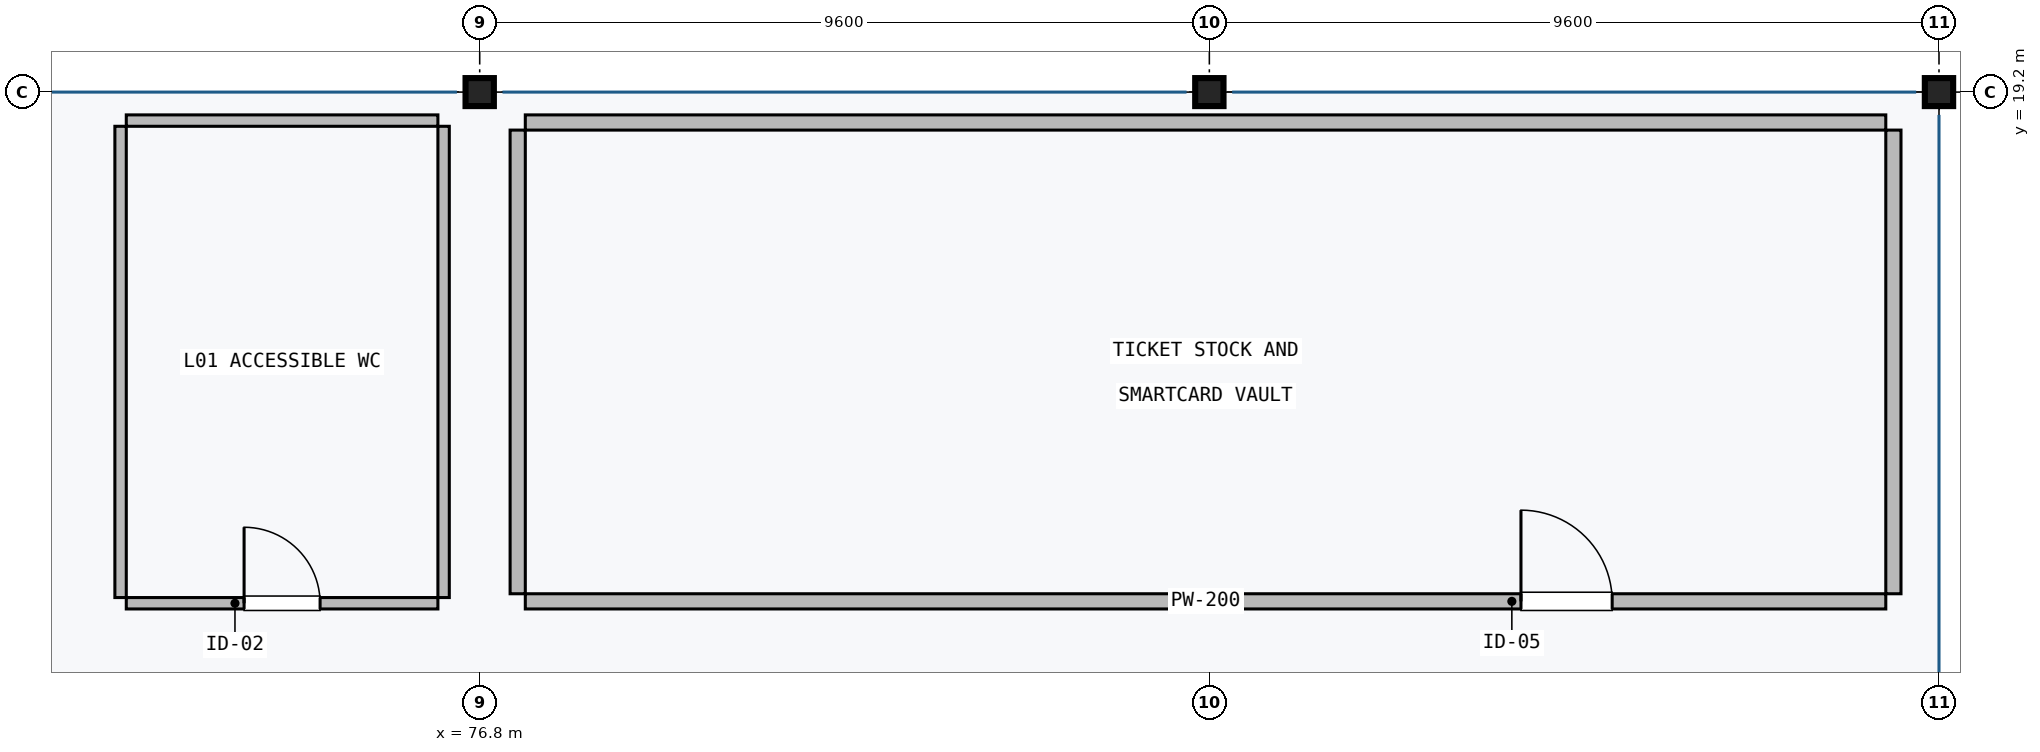
"""IFC4 building model, lengths in metres.
Left out: names, types, materials, properties, quantities, classifications, styles, units other than length and angle.
Written with IfcOpenShell. Run it as: python <this file> out.ifc"""

import sys

from ifc_helpers import new_model, si_unit, direction, frame, frame_2d, origin, origin_2d, place, context, subcontext, project, spatial, rectangle, i_section, extrude, element, fill, save


model = new_model("IFC4")
c1 = context("Model", 3, precision=1e-05, world=origin(), true_north=direction((0.0, 1.0)))
c2 = subcontext(c1, "Body", "Model", "MODEL_VIEW")
j1 = project(units=[si_unit("LENGTHUNIT", "METRE"), si_unit("PLANEANGLEUNIT", "RADIAN")], contexts=[c1])
p1 = place(None, origin())
s1 = spatial("IfcSite", under=j1, at=p1, CompositionType="ELEMENT")
p2 = place(p1, origin())
s2 = spatial("IfcBuilding", under=s1, at=p2, CompositionType="ELEMENT")
p3 = place(p2, frame((0.0, 0.0, 6.0)))
s3 = spatial("IfcBuildingStorey", under=s2, at=p3, CompositionType="ELEMENT", Elevation=6.0)
for number, where, z_axis, x_axis in (
    (1, (76.8, 19.2, 0.0), (0.0, 0.0, 1.0), (1.0, 0.0, 0.0)),
    (2, (86.4, 19.2, 0.0), (0.0, 0.0, 1.0), (1.0, 0.0, 0.0)),
    (3, (96.0, 19.2, 0.0), (0.0, 0.0, 1.0), (1.0, 0.0, 0.0)),
):
    element("IfcColumn", number, at=place(p3, frame(where, z_axis=z_axis, x_axis=x_axis)), inside=s3, PredefinedType="COLUMN", context=c2, shape_type="SweptSolid", body=[
        extrude(i_section(OverallWidth=0.373, OverallDepth=0.368, WebThickness=0.014, FlangeThickness=0.024, FilletRadius=0.015, at=origin_2d()), origin(), (0.0, 0.0, 1.0), 4.25),
    ])
p4 = place(p3, frame((95.3, 12.5, 0.0), z_axis=(0.0, 0.0, 1.0), x_axis=(-1.0, 0.0, 0.0)))
e4 = element("IfcWall", 4, at=p4, inside=s3, PredefinedType="PARTITIONING", context=c2, shape_type="SweptSolid", body=[
    extrude(rectangle(XDim=17.9, YDim=0.2, at=frame_2d((8.95, 0.0))), origin(), (0.0, 0.0, 1.0), 3.707),
])
p5 = place(p4, frame((3.6, 0.0, 0.0)))
e5 = element("IfcOpeningElement", 5, at=p5, cuts=e4, PredefinedType="OPENING", context=c2, shape_type="SweptSolid", body=[
    extrude(rectangle(XDim=1.2, YDim=2.2, at=frame_2d((0.6, 1.1))), frame((0.0, 0.11, 0.0), z_axis=(0.0, -1.0, 0.0), x_axis=(1.0, 0.0, 0.0)), (0.0, 0.0, 1.0), 0.22),
])
p6 = place(p3, frame((77.4, 18.8, 0.0), z_axis=(0.0, 0.0, 1.0), x_axis=(1.0, 0.0, 0.0)))
e6 = element("IfcWall", 6, at=p6, inside=s3, PredefinedType="PARTITIONING", context=c2, shape_type="SweptSolid", body=[
    extrude(rectangle(XDim=17.9, YDim=0.2, at=frame_2d((8.95, 0.0))), origin(), (0.0, 0.0, 1.0), 3.707),
])
for number, where, z_axis, x_axis in (
    (7, (77.3, 12.6, 0.0), (0.0, 0.0, 1.0), (0.0, 1.0, 0.0)),
    (8, (95.4, 18.7, 0.0), (0.0, 0.0, 1.0), (0.0, -1.0, 0.0)),
):
    element("IfcWall", number, at=place(p3, frame(where, z_axis=z_axis, x_axis=x_axis)), inside=s3, PredefinedType="PARTITIONING", context=c2, shape_type="SweptSolid", body=[
        extrude(rectangle(XDim=6.1, YDim=0.2, at=frame_2d((3.05, 0.0))), origin(), (0.0, 0.0, 1.0), 3.89),
    ])
p7 = place(p3, frame((76.25, 12.475, 0.0), z_axis=(0.0, 0.0, 1.0), x_axis=(-1.0, 0.0, 0.0)))
e9 = element("IfcWall", 9, at=p7, inside=s3, PredefinedType="PLUMBINGWALL", context=c2, shape_type="SweptSolid", body=[
    extrude(rectangle(XDim=4.1, YDim=0.15, at=frame_2d((2.05, 0.0))), origin(), (0.0, 0.0, 1.0), 3.89),
])
p8 = place(p7, frame((1.55, 0.0, 0.0)))
e10 = element("IfcOpeningElement", 10, at=p8, cuts=e9, PredefinedType="OPENING", context=c2, shape_type="SweptSolid", body=[
    extrude(rectangle(XDim=1.0, YDim=2.15, at=frame_2d((0.5, 1.075))), frame((0.0, 0.085, 0.0), z_axis=(0.0, -1.0, 0.0), x_axis=(1.0, 0.0, 0.0)), (0.0, 0.0, 1.0), 0.17),
])
p9 = place(p3, frame((72.15, 18.825, 0.0), z_axis=(0.0, 0.0, 1.0), x_axis=(1.0, 0.0, 0.0)))
e11 = element("IfcWall", 11, at=p9, inside=s3, PredefinedType="PLUMBINGWALL", context=c2, shape_type="SweptSolid", body=[
    extrude(rectangle(XDim=4.1, YDim=0.15, at=frame_2d((2.05, 0.0))), origin(), (0.0, 0.0, 1.0), 3.89),
])
for number, where, z_axis, x_axis in (
    (12, (72.075, 12.55, 0.0), (0.0, 0.0, 1.0), (0.0, 1.0, 0.0)),
    (13, (76.325, 18.75, 0.0), (0.0, 0.0, 1.0), (0.0, -1.0, 0.0)),
):
    element("IfcWall", number, at=place(p3, frame(where, z_axis=z_axis, x_axis=x_axis)), inside=s3, PredefinedType="PLUMBINGWALL", context=c2, shape_type="SweptSolid", body=[
        extrude(rectangle(XDim=6.2, YDim=0.15, at=frame_2d((3.1, 0.0))), origin(), (0.0, 0.0, 1.0), 3.89),
    ])
p10 = place(p5, frame((1.2, 0.0, 0.0), z_axis=(0.0, 0.0, 1.0), x_axis=(-1.0, 0.0, 0.0)))
e14 = element("IfcDoor", 14, at=p10, inside=s3, OperationType="SINGLE_SWING_RIGHT", PredefinedType="DOOR", context=c2, shape_type="SweptSolid", body=[
    extrude(rectangle(XDim=1.2, YDim=2.2, at=frame_2d((0.6, 1.1))), frame((0.0, 0.025, 0.0), z_axis=(0.0, -1.0, 0.0), x_axis=(1.0, 0.0, 0.0)), (0.0, 0.0, 1.0), 0.05),
])
fill(e5, e14)
p11 = place(p8, frame((1.0, 0.0, 0.0), z_axis=(0.0, 0.0, 1.0), x_axis=(-1.0, 0.0, 0.0)))
e15 = element("IfcDoor", 15, at=p11, inside=s3, OperationType="SINGLE_SWING_RIGHT", PredefinedType="DOOR", context=c2, shape_type="SweptSolid", body=[
    extrude(rectangle(XDim=1.0, YDim=2.15, at=frame_2d((0.5, 1.075))), frame((0.0, 0.025, 0.0), z_axis=(0.0, -1.0, 0.0), x_axis=(1.0, 0.0, 0.0)), (0.0, 0.0, 1.0), 0.05),
])
fill(e10, e15)
save(model, sys.argv[1])
